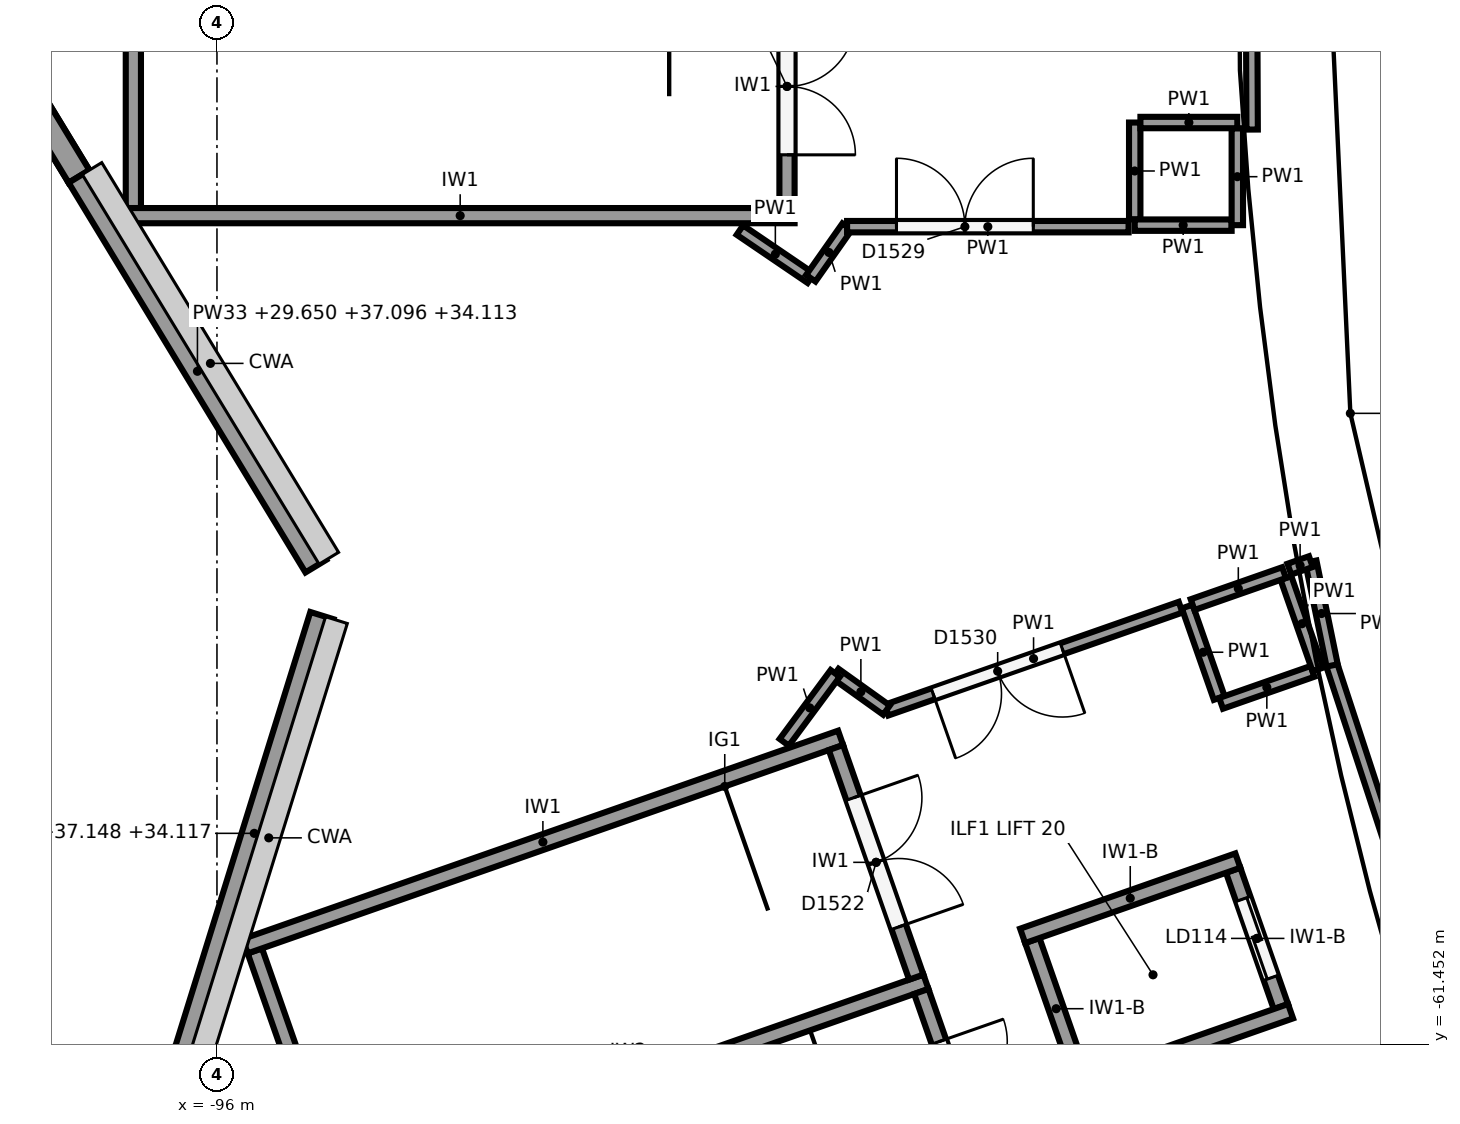
"""IFC4 building model, lengths in metres.
Left out: names, types, materials, properties, quantities, classifications, styles, units other than length and angle.
Written with IfcOpenShell. Run it as: python <this file> out.ifc"""

import sys

from ifc_helpers import new_model, si_unit, direction, frame, frame_2d, origin, origin_2d, place, context, subcontext, project, spatial, polyline, rectangle, circle, outline, extrude, element, fill, save


model = new_model("IFC4")
c1 = context("Model", 3, precision=1e-05, world=origin(), true_north=direction((0.0, 1.0)))
c2 = subcontext(c1, "Body", "Model", "MODEL_VIEW")
j1 = project(units=[si_unit("LENGTHUNIT", "METRE"), si_unit("PLANEANGLEUNIT", "RADIAN")], contexts=[c1])
p1 = place(None, origin())
s1 = spatial("IfcSite", under=j1, at=p1, CompositionType="ELEMENT")
p2 = place(p1, origin())
s2 = spatial("IfcBuilding", under=s1, at=p2, CompositionType="ELEMENT")
p3 = place(p2, frame((0.0, 0.0, 24.0)))
s3 = spatial("IfcBuildingStorey", under=s2, at=p3, CompositionType="ELEMENT", Elevation=24.0)
p4 = place(p3, frame((-84.325, -53.802, 0.0), z_axis=(0.0, 0.0, 1.0), x_axis=(1.0, 0.0, 0.0)))
e1 = element("IfcColumn", 1, at=p4, inside=s3, PredefinedType="COLUMN", context=c2, shape_type="SweptSolid", body=[
    extrude(circle(Radius=0.5, at=origin_2d()), origin(), (0.0, 0.0, 1.0), 6.0),
])
p5 = place(p3, frame((-94.294, -55.441, 0.0), z_axis=(0.0, 0.0, 1.0), x_axis=(1.0, 0.0, 0.0)))
e2 = element("IfcColumn", 2, at=p5, inside=s3, PredefinedType="COLUMN", context=c2, shape_type="SweptSolid", body=[
    extrude(circle(Radius=0.45, at=origin_2d()), origin(), (0.0, 0.0, 1.0), 6.0),
])
p6 = place(p3, frame((-97.815, -50.034, 0.0), z_axis=(0.0, 0.0, 1.0), x_axis=(-0.519367009964, 0.854551291007, 0.0)))
e3 = element("IfcWall", 3, at=p6, inside=s3, PredefinedType="SOLIDWALL", context=c2, shape_type="SweptSolid", body=[
    extrude(rectangle(XDim=6.732, YDim=0.32, at=frame_2d((3.366, 0.0))), origin(), (0.0, 0.0, 1.0), 6.0),
])
p7 = place(p6, frame((5.25, 0.0, 1.0)))
e4 = element("IfcOpeningElement", 4, at=p7, cuts=e3, PredefinedType="OPENING", context=c2, shape_type="SweptSolid", body=[
    extrude(rectangle(XDim=0.9, YDim=3.25, at=frame_2d((0.45, 1.625))), frame((0.0, 0.17, 0.0), z_axis=(0.0, -1.0, 0.0), x_axis=(1.0, 0.0, 0.0)), (0.0, 0.0, 1.0), 0.34),
])
p8 = place(p3, frame((-97.815, -50.034, 6.0), z_axis=(0.0, 0.0, 1.0), x_axis=(-0.519367009964, 0.854551291007, 0.0)))
e5 = element("IfcWall", 5, at=p8, inside=s3, PredefinedType="SOLIDWALL", context=c2, shape_type="SweptSolid", body=[
    extrude(outline(polyline([(0.0, 0.0), (6.732, 0.0), (6.732, 10.442), (0.0, 7.095), (0.0, 0.0)])), frame((0.0, 0.16, 0.0), z_axis=(0.0, -1.0, 0.0), x_axis=(1.0, 0.0, 0.0)), (0.0, 0.0, 1.0), 0.32),
])
p9 = place(p8, frame((5.25, 0.0, 1.6)))
e6 = element("IfcOpeningElement", 6, at=p9, cuts=e5, PredefinedType="OPENING", context=c2, shape_type="SweptSolid", body=[
    extrude(rectangle(XDim=0.9, YDim=3.0, at=frame_2d((0.45, 1.5))), frame((0.0, 0.17, 0.0), z_axis=(0.0, -1.0, 0.0), x_axis=(1.0, 0.0, 0.0)), (0.0, 0.0, 1.0), 0.34),
])
p10 = place(p3, frame((-94.699, -55.161, 5.65), z_axis=(0.0, 0.0, 1.0), x_axis=(-0.519376262918, 0.85454566731, 0.0)))
e7 = element("IfcWall", 7, at=p10, inside=s3, PredefinedType="SOLIDWALL", context=c2, shape_type="SweptSolid", body=[
    extrude(outline(polyline([(0.0, 0.0), (6.0, 0.0), (6.0, 7.446), (0.0, 4.463), (0.0, 0.0)])), frame((0.0, 0.16, 0.0), z_axis=(0.0, -1.0, 0.0), x_axis=(1.0, 0.0, 0.0)), (0.0, 0.0, 1.0), 0.32),
])
p11 = place(p3, frame((-96.4, -61.541, 5.65), z_axis=(0.0, 0.0, 1.0), x_axis=(0.29687527919, 0.954916262615, 0.0)))
e8 = element("IfcWall", 8, at=p11, inside=s3, PredefinedType="SOLIDWALL", context=c2, shape_type="SweptSolid", body=[
    extrude(outline(polyline([(0.0, 0.0), (6.0, 0.0), (6.0, 4.467), (0.0, 7.498), (0.0, 0.0)])), frame((0.0, 0.16, 0.0), z_axis=(0.0, -1.0, 0.0), x_axis=(1.0, 0.0, 0.0)), (0.0, 0.0, 1.0), 0.32),
])
p12 = place(p3, frame((-97.2, -50.55, 0.0), z_axis=(0.0, 0.0, 1.0), x_axis=(1.0, 0.0, 0.0)))
e9 = element("IfcWall", 9, at=p12, inside=s3, PredefinedType="SHEAR", context=c2, shape_type="SweptSolid", body=[
    extrude(rectangle(XDim=8.8, YDim=0.2, at=frame_2d((4.4, 0.0))), origin(), (0.0, 0.0, 1.0), 5.75),
])
p13 = place(p3, frame((-97.1, -43.85, 0.0), z_axis=(0.0, 0.0, 1.0), x_axis=(0.0, -1.0, 0.0)))
e10 = element("IfcWall", 10, at=p13, inside=s3, PredefinedType="SHEAR", context=c2, shape_type="SweptSolid", body=[
    extrude(rectangle(XDim=6.6, YDim=0.2, at=frame_2d((3.3, 0.0))), origin(), (0.0, 0.0, 1.0), 5.75),
])
p14 = place(p3, frame((-88.5, -47.25, 0.0), z_axis=(0.0, 0.0, 1.0), x_axis=(0.0, -1.0, 0.0)))
e11 = element("IfcWall", 11, at=p14, inside=s3, PredefinedType="SHEAR", context=c2, shape_type="SweptSolid", body=[
    extrude(rectangle(XDim=3.2, YDim=0.2, at=frame_2d((1.6, 0.0))), origin(), (0.0, 0.0, 1.0), 5.75),
])
p15 = place(p14, frame((0.7, 0.0, 0.0)))
e12 = element("IfcOpeningElement", 12, at=p15, cuts=e11, PredefinedType="OPENING", context=c2, shape_type="SweptSolid", body=[
    extrude(rectangle(XDim=1.8, YDim=2.1, at=frame_2d((0.9, 1.05))), frame((0.0, 0.11, 0.0), z_axis=(0.0, -1.0, 0.0), x_axis=(1.0, 0.0, 0.0)), (0.0, 0.0, 1.0), 0.22),
])
p16 = place(p3, frame((-95.629, -60.162, 0.0), z_axis=(0.0, 0.0, 1.0), x_axis=(0.943887243331, 0.330267878966, 0.0)))
e13 = element("IfcWall", 13, at=p16, inside=s3, PredefinedType="SHEAR", context=c2, shape_type="SweptSolid", body=[
    extrude(rectangle(XDim=8.3, YDim=0.2, at=frame_2d((4.15, 0.0))), origin(), (0.0, 0.0, 1.0), 5.75),
])
p17 = place(p3, frame((-95.501, -60.223, 0.0), z_axis=(0.0, 0.0, 1.0), x_axis=(0.330286164688, -0.943880844925, 0.0)))
e14 = element("IfcWall", 14, at=p17, inside=s3, PredefinedType="SHEAR", context=c2, shape_type="SweptSolid", body=[
    extrude(rectangle(XDim=6.6, YDim=0.2, at=frame_2d((3.3, 0.0))), origin(), (0.0, 0.0, 1.0), 5.75),
])
p18 = place(p3, frame((-94.506, -63.371, 0.0), z_axis=(0.0, 0.0, 1.0), x_axis=(0.943878073457, 0.330294084791, 0.0)))
e15 = element("IfcWall", 15, at=p18, inside=s3, PredefinedType="SHEAR", context=c2, shape_type="SweptSolid", body=[
    extrude(rectangle(XDim=8.3, YDim=0.2, at=frame_2d((4.15, 0.0))), origin(), (0.0, 0.0, 1.0), 5.75),
])
p19 = place(p3, frame((-87.856, -57.548, 0.0), z_axis=(0.0, 0.0, 1.0), x_axis=(0.330268863922, -0.943886898693, 0.0)))
e16 = element("IfcWall", 16, at=p19, inside=s3, PredefinedType="SHEAR", context=c2, shape_type="SweptSolid", body=[
    extrude(rectangle(XDim=3.2, YDim=0.2, at=frame_2d((1.6, 0.0))), origin(), (0.0, 0.0, 1.0), 5.75),
])
p20 = place(p19, frame((0.7, 0.0, 0.0)))
e17 = element("IfcOpeningElement", 17, at=p20, cuts=e16, PredefinedType="OPENING", context=c2, shape_type="SweptSolid", body=[
    extrude(rectangle(XDim=1.8, YDim=2.1, at=frame_2d((0.9, 1.05))), frame((0.0, 0.11, 0.0), z_axis=(0.0, -1.0, 0.0), x_axis=(1.0, 0.0, 0.0)), (0.0, 0.0, 1.0), 0.22),
])
p21 = place(p3, frame((-86.733, -60.757, 0.0), z_axis=(0.0, 0.0, 1.0), x_axis=(0.330268863922, -0.943886898693, 0.0)))
e18 = element("IfcWall", 18, at=p21, inside=s3, PredefinedType="SHEAR", context=c2, shape_type="SweptSolid", body=[
    extrude(rectangle(XDim=3.2, YDim=0.2, at=frame_2d((1.6, 0.0))), origin(), (0.0, 0.0, 1.0), 5.75),
])
p22 = place(p21, frame((0.7, 0.0, 0.0)))
e19 = element("IfcOpeningElement", 19, at=p22, cuts=e18, PredefinedType="OPENING", context=c2, shape_type="SweptSolid", body=[
    extrude(rectangle(XDim=1.8, YDim=2.1, at=frame_2d((0.9, 1.05))), frame((0.0, 0.11, 0.0), z_axis=(0.0, -1.0, 0.0), x_axis=(1.0, 0.0, 0.0)), (0.0, 0.0, 1.0), 0.22),
])
p23 = place(p3, frame((-85.4, -60.025, 0.0), z_axis=(0.0, 0.0, 1.0), x_axis=(0.943900215722, 0.330230802259, 0.0)))
e20 = element("IfcWall", 20, at=p23, inside=s3, PredefinedType="SHEAR", context=c2, shape_type="SweptSolid", body=[
    extrude(rectangle(XDim=3.0, YDim=0.2, at=frame_2d((1.5, 0.0))), origin(), (0.0, 0.0, 1.0), 4.6),
])
p24 = place(p3, frame((-84.706, -62.008, 0.0), z_axis=(0.0, 0.0, 1.0), x_axis=(0.943874847782, 0.330303302625, 0.0)))
e21 = element("IfcWall", 21, at=p24, inside=s3, PredefinedType="SHEAR", context=c2, shape_type="SweptSolid", body=[
    extrude(rectangle(XDim=3.0, YDim=0.2, at=frame_2d((1.5, 0.0))), origin(), (0.0, 0.0, 1.0), 4.6),
])
p25 = place(p3, frame((-85.272, -60.087, 0.0), z_axis=(0.0, 0.0, 1.0), x_axis=(0.330224505327, -0.943902418729, 0.0)))
e22 = element("IfcWall", 22, at=p25, inside=s3, PredefinedType="SHEAR", context=c2, shape_type="SweptSolid", body=[
    extrude(rectangle(XDim=1.9, YDim=0.2, at=frame_2d((0.95, 0.0))), origin(), (0.0, 0.0, 1.0), 4.6),
])
p26 = place(p3, frame((-82.629, -59.162, 0.0), z_axis=(0.0, 0.0, 1.0), x_axis=(0.330224505327, -0.943902418729, 0.0)))
e23 = element("IfcWall", 23, at=p26, inside=s3, PredefinedType="SHEAR", context=c2, shape_type="SweptSolid", body=[
    extrude(rectangle(XDim=1.9, YDim=0.2, at=frame_2d((0.95, 0.0))), origin(), (0.0, 0.0, 1.0), 4.6),
])
p27 = place(p26, frame((0.4, 0.0, 0.0)))
e24 = element("IfcOpeningElement", 24, at=p27, cuts=e23, PredefinedType="OPENING", context=c2, shape_type="SweptSolid", body=[
    extrude(rectangle(XDim=1.1, YDim=2.1, at=frame_2d((0.55, 1.05))), frame((0.0, 0.11, 0.0), z_axis=(0.0, -1.0, 0.0), x_axis=(1.0, 0.0, 0.0)), (0.0, 0.0, 1.0), 0.22),
])
for number, where, z_axis, x_axis in (
    (25, (-83.925, -49.325, 0.0), (0.0, 0.0, 1.0), (0.0, -1.0, 0.0)),
    (26, (-83.925, -50.675, 0.0), (0.0, 0.0, 1.0), (1.0, 0.0, 0.0)),
    (27, (-82.575, -50.675, 0.0), (0.0, 0.0, 1.0), (0.0, 1.0, 0.0)),
    (28, (-82.575, -49.325, 0.0), (0.0, 0.0, 1.0), (-1.0, 0.0, 0.0)),
):
    element("IfcWall", number, at=place(p3, frame(where, z_axis=z_axis, x_axis=x_axis)), inside=s3, PredefinedType="PARTITIONING", context=c2, shape_type="SweptSolid", body=[
        extrude(rectangle(XDim=1.275, YDim=0.15, at=frame_2d((0.638, 0.0))), origin(), (0.0, 0.0, 1.0), 5.4),
    ])
p28 = place(p3, frame((-89.12, -50.74, 0.0), z_axis=(0.0, 0.0, 1.0), x_axis=(0.827055308354, -0.562120553728, 0.0)))
e29 = element("IfcWall", 29, at=p28, inside=s3, PredefinedType="PARTITIONING", context=c2, shape_type="SweptSolid", body=[
    extrude(rectangle(XDim=1.128, YDim=0.15, at=frame_2d((0.564, 0.0))), origin(), (0.0, 0.0, 1.0), 5.4),
])
p29 = place(p3, frame((-88.187, -51.374, 0.0), z_axis=(0.0, 0.0, 1.0), x_axis=(0.575376756214, 0.817888493872, 0.0)))
e30 = element("IfcWall", 30, at=p29, inside=s3, PredefinedType="PARTITIONING", context=c2, shape_type="SweptSolid", body=[
    extrude(rectangle(XDim=0.83, YDim=0.15, at=frame_2d((0.415, 0.0))), origin(), (0.0, 0.0, 1.0), 5.4),
])
p30 = place(p3, frame((-87.709, -50.695, 0.0), z_axis=(0.0, 0.0, 1.0), x_axis=(1.0, 0.0, 0.0)))
e31 = element("IfcWall", 31, at=p30, inside=s3, PredefinedType="PARTITIONING", context=c2, shape_type="SweptSolid", body=[
    extrude(rectangle(XDim=3.704, YDim=0.15, at=frame_2d((1.852, 0.0))), origin(), (0.0, 0.0, 1.0), 5.4),
])
p31 = place(p30, frame((0.65, 0.0, 0.0)))
e32 = element("IfcOpeningElement", 32, at=p31, cuts=e31, PredefinedType="OPENING", context=c2, shape_type="SweptSolid", body=[
    extrude(rectangle(XDim=1.8, YDim=2.1, at=frame_2d((0.9, 1.05))), frame((0.0, 0.085, 0.0), z_axis=(0.0, -1.0, 0.0), x_axis=(1.0, 0.0, 0.0)), (0.0, 0.0, 1.0), 0.17),
])
p32 = place(p3, frame((-82.38, -49.417, 0.0), z_axis=(0.0, 0.0, 1.0), x_axis=(-0.004239136529, 0.99999101482, 0.0)))
e33 = element("IfcWall", 33, at=p32, inside=s3, PredefinedType="PARTITIONING", context=c2, shape_type="SweptSolid", body=[
    extrude(rectangle(XDim=12.613, YDim=0.15, at=frame_2d((6.306, 0.0))), origin(), (0.0, 0.0, 1.0), 5.4),
])
for number, where, z_axis, x_axis in (
    (34, (-83.235, -55.692, 0.0), (0.0, 0.0, 1.0), (0.33, -0.944, 0.0)),
    (35, (-82.789, -56.966, 0.0), (0.0, 0.0, 1.0), (0.944, 0.33, 0.0)),
    (36, (-81.514, -56.521, 0.0), (0.0, 0.0, 1.0), (-0.33, 0.944, 0.0)),
):
    element("IfcWall", number, at=place(p3, frame(where, z_axis=z_axis, x_axis=x_axis)), inside=s3, PredefinedType="PARTITIONING", context=c2, shape_type="SweptSolid", body=[
        extrude(rectangle(XDim=1.275, YDim=0.15, at=frame_2d((0.637, 0.0))), origin(), (0.0, 0.0, 1.0), 5.4),
    ])
p33 = place(p3, frame((-81.96, -55.246, 0.0), z_axis=(0.0, 0.0, 1.0), x_axis=(-0.943888201207, -0.330265141396, 0.0)))
e37 = element("IfcWall", 37, at=p33, inside=s3, PredefinedType="PARTITIONING", context=c2, shape_type="SweptSolid", body=[
    extrude(rectangle(XDim=1.275, YDim=0.15, at=frame_2d((0.638, 0.0))), origin(), (0.0, 0.0, 1.0), 5.4),
])
p34 = place(p3, frame((-77.435, -68.357, 0.0), z_axis=(0.0, 0.0, 1.0), x_axis=(-0.311320262687, 0.950305053149, 0.0)))
e38 = element("IfcWall", 38, at=p34, inside=s3, PredefinedType="PARTITIONING", context=c2, shape_type="SweptSolid", body=[
    extrude(rectangle(XDim=12.532, YDim=0.15, at=frame_2d((6.266, 0.0))), origin(), (0.0, 0.0, 1.0), 5.4),
])
p35 = place(p3, frame((-81.327, -56.468, 0.0), z_axis=(0.0, 0.0, 1.0), x_axis=(-0.200862273188, 0.979619491032, 0.0)))
e39 = element("IfcWall", 39, at=p35, inside=s3, PredefinedType="PARTITIONING", context=c2, shape_type="SweptSolid", body=[
    extrude(rectangle(XDim=1.394, YDim=0.15, at=frame_2d((0.697, 0.0))), origin(), (0.0, 0.0, 1.0), 5.4),
])
p36 = place(p3, frame((-81.607, -55.102, 0.0), z_axis=(0.0, 0.0, 1.0), x_axis=(-0.944111851886, -0.329625258633, 0.0)))
e40 = element("IfcWall", 40, at=p36, inside=s3, PredefinedType="PARTITIONING", context=c2, shape_type="SweptSolid", body=[
    extrude(rectangle(XDim=0.3, YDim=0.15, at=frame_2d((0.15, 0.0))), origin(), (0.0, 0.0, 1.0), 5.4),
])
p37 = place(p3, frame((-83.321, -55.701, 0.0), z_axis=(0.0, 0.0, 1.0), x_axis=(-0.943873211719, -0.330307977801, 0.0)))
e41 = element("IfcWall", 41, at=p37, inside=s3, PredefinedType="PARTITIONING", context=c2, shape_type="SweptSolid", body=[
    extrude(rectangle(XDim=4.099, YDim=0.15, at=frame_2d((2.05, 0.0))), origin(), (0.0, 0.0, 1.0), 5.4),
])
p38 = place(p37, frame((1.65, 0.0, 0.0)))
e42 = element("IfcOpeningElement", 42, at=p38, cuts=e41, PredefinedType="OPENING", context=c2, shape_type="SweptSolid", body=[
    extrude(rectangle(XDim=1.8, YDim=2.1, at=frame_2d((0.9, 1.05))), frame((0.0, 0.085, 0.0), z_axis=(0.0, -1.0, 0.0), x_axis=(1.0, 0.0, 0.0)), (0.0, 0.0, 1.0), 0.17),
])
p39 = place(p3, frame((-87.19, -57.055, 0.0), z_axis=(0.0, 0.0, 1.0), x_axis=(-0.813315890962, 0.581822362504, 0.0)))
e43 = element("IfcWall", 43, at=p39, inside=s3, PredefinedType="PARTITIONING", context=c2, shape_type="SweptSolid", body=[
    extrude(rectangle(XDim=0.83, YDim=0.15, at=frame_2d((0.415, 0.0))), origin(), (0.0, 0.0, 1.0), 5.4),
])
p40 = place(p3, frame((-87.865, -56.573, 0.0), z_axis=(0.0, 0.0, 1.0), x_axis=(-0.595036002288, -0.803699045651, 0.0)))
e44 = element("IfcWall", 44, at=p40, inside=s3, PredefinedType="PARTITIONING", context=c2, shape_type="SweptSolid", body=[
    extrude(rectangle(XDim=1.128, YDim=0.15, at=frame_2d((0.564, 0.0))), origin(), (0.0, 0.0, 1.0), 5.4),
])
p41 = place(p15, origin())
e45 = element("IfcDoor", 45, at=p41, inside=s3, OperationType="DOUBLE_DOOR_SINGLE_SWING", PredefinedType="DOOR", context=c2, shape_type="SweptSolid", body=[
    extrude(rectangle(XDim=1.8, YDim=2.1, at=frame_2d((0.9, 1.05))), frame((0.0, 0.025, 0.0), z_axis=(0.0, -1.0, 0.0), x_axis=(1.0, 0.0, 0.0)), (0.0, 0.0, 1.0), 0.05),
])
fill(e12, e45)
p42 = place(p20, origin())
e46 = element("IfcDoor", 46, at=p42, inside=s3, OperationType="DOUBLE_DOOR_SINGLE_SWING", PredefinedType="DOOR", context=c2, shape_type="SweptSolid", body=[
    extrude(rectangle(XDim=1.8, YDim=2.1, at=frame_2d((0.9, 1.05))), frame((0.0, 0.025, 0.0), z_axis=(0.0, -1.0, 0.0), x_axis=(1.0, 0.0, 0.0)), (0.0, 0.0, 1.0), 0.05),
])
fill(e17, e46)
p43 = place(p22, origin())
e47 = element("IfcDoor", 47, at=p43, inside=s3, OperationType="DOUBLE_DOOR_SINGLE_SWING", PredefinedType="DOOR", context=c2, shape_type="SweptSolid", body=[
    extrude(rectangle(XDim=1.8, YDim=2.1, at=frame_2d((0.9, 1.05))), frame((0.0, 0.025, 0.0), z_axis=(0.0, -1.0, 0.0), x_axis=(1.0, 0.0, 0.0)), (0.0, 0.0, 1.0), 0.05),
])
fill(e19, e47)
p44 = place(p27, origin())
e48 = element("IfcDoor", 48, at=p44, inside=s3, OperationType="SLIDING_TO_RIGHT", PredefinedType="DOOR", context=c2, shape_type="SweptSolid", body=[
    extrude(rectangle(XDim=1.1, YDim=2.1, at=frame_2d((0.55, 1.05))), frame((0.0, 0.025, 0.0), z_axis=(0.0, -1.0, 0.0), x_axis=(1.0, 0.0, 0.0)), (0.0, 0.0, 1.0), 0.05),
])
fill(e24, e48)
p45 = place(p31, origin())
e49 = element("IfcDoor", 49, at=p45, inside=s3, OperationType="DOUBLE_DOOR_SINGLE_SWING", PredefinedType="DOOR", context=c2, shape_type="SweptSolid", body=[
    extrude(rectangle(XDim=1.8, YDim=2.1, at=frame_2d((0.9, 1.05))), frame((0.0, 0.025, 0.0), z_axis=(0.0, -1.0, 0.0), x_axis=(1.0, 0.0, 0.0)), (0.0, 0.0, 1.0), 0.05),
])
fill(e32, e49)
p46 = place(p38, origin())
e50 = element("IfcDoor", 50, at=p46, inside=s3, OperationType="DOUBLE_DOOR_SINGLE_SWING", PredefinedType="DOOR", context=c2, shape_type="SweptSolid", body=[
    extrude(rectangle(XDim=1.8, YDim=2.1, at=frame_2d((0.9, 1.05))), frame((0.0, 0.025, 0.0), z_axis=(0.0, -1.0, 0.0), x_axis=(1.0, 0.0, 0.0)), (0.0, 0.0, 1.0), 0.05),
])
fill(e42, e50)
save(model, sys.argv[1])
